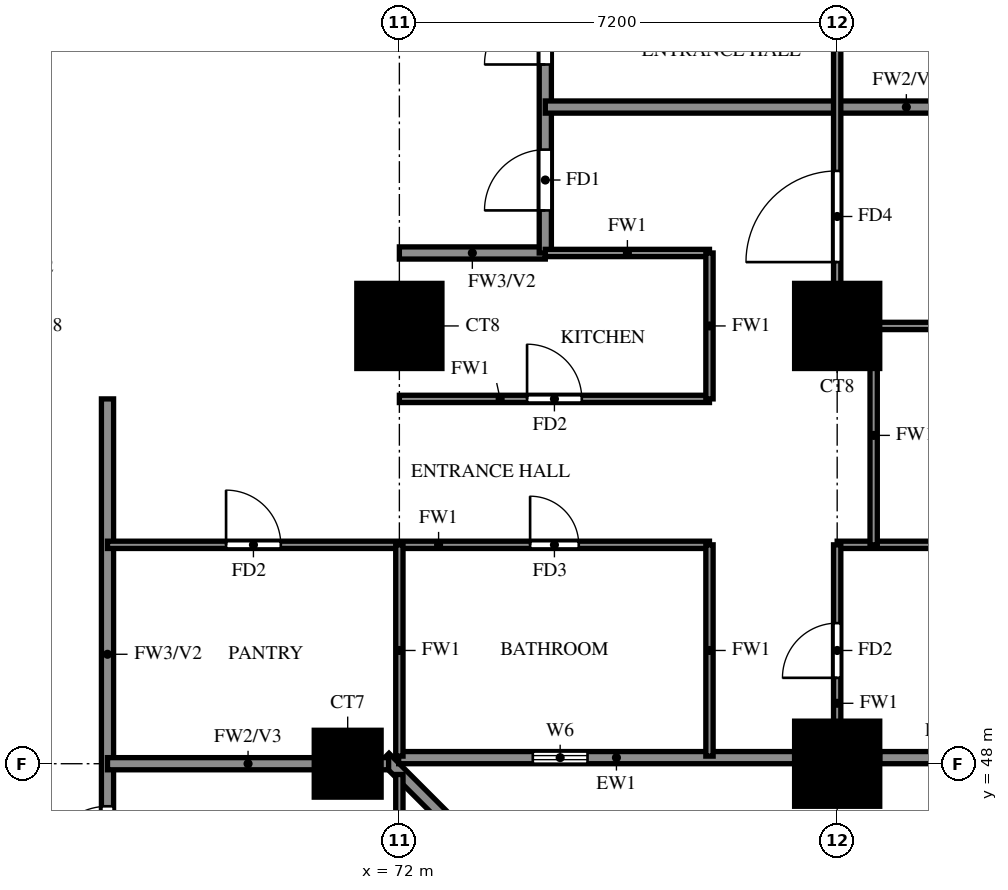
"""IFC4 building model, lengths in metres.
Left out: names, types, materials, properties, quantities, classifications, styles, units other than length and angle.
Written with IfcOpenShell. Run it as: python <this file> out.ifc"""

import sys

from ifc_helpers import new_model, si_unit, direction, frame, frame_2d, origin, origin_2d, place, context, subcontext, project, spatial, rectangle, extrude, source, transform, mapped, element, fill, save


model = new_model("IFC4")
c1 = context("Model", 3, precision=1e-05, world=origin(), true_north=direction((0.0, 1.0)))
c2 = subcontext(c1, "Body", "Model", "MODEL_VIEW")
j1 = project(units=[si_unit("LENGTHUNIT", "METRE"), si_unit("PLANEANGLEUNIT", "RADIAN")], contexts=[c1])
p1 = place(None, origin())
s1 = spatial("IfcSite", under=j1, at=p1, CompositionType="ELEMENT")
p2 = place(p1, origin())
s2 = spatial("IfcBuilding", under=s1, at=p2, CompositionType="ELEMENT")
p3 = place(p2, frame((0.0, 0.0, 58.5)))
s3 = spatial("IfcBuildingStorey", under=s2, at=p3, CompositionType="ELEMENT", Elevation=58.5)
m1 = source(origin(), c2, "Body", "SweptSolid", [
    extrude(rectangle(XDim=1.1, YDim=1.1, at=origin_2d()), origin(), (0.0, 0.0, 1.0), 3.18),
])
p4 = place(p3, frame((71.15, 48.0, 0.0), z_axis=(0.0, 0.0, 1.0), x_axis=(1.0, 0.0, 0.0)))
e1 = element("IfcColumn", 1, at=p4, inside=s3, PredefinedType="COLUMN", context=c2, shape_type="MappedRepresentation", body=[
    mapped(m1, transform((0.0, 0.0, 0.0))),
])
m2 = source(origin(), c2, "Body", "SweptSolid", [
    extrude(rectangle(XDim=1.4, YDim=1.4, at=origin_2d()), origin(), (0.0, 0.0, 1.0), 3.18),
])
for number, where, z_axis, x_axis in (
    (2, (79.2, 48.0, 0.0), (0.0, 0.0, 1.0), (1.0, 0.0, 0.0)),
    (3, (72.0, 55.2, 0.0), (0.0, 0.0, 1.0), (1.0, 0.0, 0.0)),
    (4, (79.2, 55.2, 0.0), (0.0, 0.0, 1.0), (1.0, 0.0, 0.0)),
):
    element("IfcColumn", number, at=place(p3, frame(where, z_axis=z_axis, x_axis=x_axis)), inside=s3, PredefinedType="COLUMN", context=c2, shape_type="MappedRepresentation", body=[
        mapped(m2, transform((0.0, 0.0, 0.0))),
    ])
p5 = place(p3, frame((78.74, 41.118, 0.0), z_axis=(0.0, 0.0, 1.0), x_axis=(-0.707106781187, 0.707106781187, 0.0)))
e5 = element("IfcWall", 5, at=p5, inside=s3, PredefinedType="SOLIDWALL", context=c2, shape_type="SweptSolid", body=[
    extrude(rectangle(XDim=9.874, YDim=0.2, at=frame_2d((4.937, 0.0))), origin(), (0.0, 0.0, 1.0), 3.18),
])
p6 = place(p5, frame((2.264, 0.0, 0.6)))
e6 = element("IfcOpeningElement", 6, at=p6, cuts=e5, PredefinedType="OPENING", context=c2, shape_type="SweptSolid", body=[
    extrude(rectangle(XDim=2.4, YDim=2.4, at=frame_2d((1.2, 1.2))), frame((0.0, 0.11, 0.0), z_axis=(0.0, -1.0, 0.0), x_axis=(1.0, 0.0, 0.0)), (0.0, 0.0, 1.0), 0.22),
])
p7 = place(p5, frame((5.836, 0.0, 0.6)))
e7 = element("IfcOpeningElement", 7, at=p7, cuts=e5, PredefinedType="OPENING", context=c2, shape_type="SweptSolid", body=[
    extrude(rectangle(XDim=2.4, YDim=2.4, at=frame_2d((1.2, 1.2))), frame((0.0, 0.11, 0.0), z_axis=(0.0, -1.0, 0.0), x_axis=(1.0, 0.0, 0.0)), (0.0, 0.0, 1.0), 0.22),
])
p8 = place(p3, frame((71.989, 48.1, 0.0), z_axis=(0.0, 0.0, 1.0), x_axis=(1.0, 0.0, 0.0)))
e8 = element("IfcWall", 8, at=p8, inside=s3, PredefinedType="SOLIDWALL", context=c2, shape_type="SweptSolid", body=[
    extrude(rectangle(XDim=6.511, YDim=0.2, at=frame_2d((3.256, 0.0))), origin(), (0.0, 0.0, 1.0), 3.18),
])
p9 = place(p8, frame((2.206, 0.0, 1.5)))
e9 = element("IfcOpeningElement", 9, at=p9, cuts=e8, PredefinedType="OPENING", context=c2, shape_type="SweptSolid", body=[
    extrude(rectangle(XDim=0.9, YDim=0.9, at=frame_2d((0.45, 0.45))), frame((0.0, 0.11, 0.0), z_axis=(0.0, -1.0, 0.0), x_axis=(1.0, 0.0, 0.0)), (0.0, 0.0, 1.0), 0.22),
])
p10 = place(p3, frame((79.9, 48.1, 0.0), z_axis=(0.0, 0.0, 1.0), x_axis=(1.0, 0.0, 0.0)))
e10 = element("IfcWall", 10, at=p10, inside=s3, PredefinedType="SOLIDWALL", context=c2, shape_type="SweptSolid", body=[
    extrude(rectangle(XDim=5.35, YDim=0.2, at=frame_2d((2.675, 0.0))), origin(), (0.0, 0.0, 1.0), 3.18),
])
p11 = place(p10, frame((1.475, 0.0, 0.6)))
e11 = element("IfcOpeningElement", 11, at=p11, cuts=e10, PredefinedType="OPENING", context=c2, shape_type="SweptSolid", body=[
    extrude(rectangle(XDim=2.4, YDim=2.4, at=frame_2d((1.2, 1.2))), frame((0.0, 0.11, 0.0), z_axis=(0.0, -1.0, 0.0), x_axis=(1.0, 0.0, 0.0)), (0.0, 0.0, 1.0), 0.22),
])
p12 = place(p3, frame((72.0, 56.4, 0.0), z_axis=(0.0, 0.0, 1.0), x_axis=(1.0, 0.0, 0.0)))
e12 = element("IfcWall", 12, at=p12, inside=s3, PredefinedType="SOLIDWALL", context=c2, shape_type="SweptSolid", body=[
    extrude(rectangle(XDim=2.4, YDim=0.2, at=frame_2d((1.2, 0.0))), origin(), (0.0, 0.0, 1.0), 3.18),
])
p13 = place(p3, frame((67.2, 45.6, 0.0), z_axis=(0.0, 0.0, 1.0), x_axis=(0.0, 1.0, 0.0)))
e13 = element("IfcWall", 13, at=p13, inside=s3, PredefinedType="SOLIDWALL", context=c2, shape_type="SweptSolid", body=[
    extrude(rectangle(XDim=8.4, YDim=0.2, at=frame_2d((4.2, 0.0))), origin(), (0.0, 0.0, 1.0), 3.18),
])
p14 = place(p13, frame((0.7, 0.0, 0.0)))
e14 = element("IfcOpeningElement", 14, at=p14, cuts=e13, PredefinedType="OPENING", context=c2, shape_type="SweptSolid", body=[
    extrude(rectangle(XDim=1.0, YDim=2.1, at=frame_2d((0.5, 1.05))), frame((0.0, 0.11, 0.0), z_axis=(0.0, -1.0, 0.0), x_axis=(1.0, 0.0, 0.0)), (0.0, 0.0, 1.0), 0.22),
])
p15 = place(p3, frame((74.4, 56.4, 0.0), z_axis=(0.0, 0.0, 1.0), x_axis=(0.0, 1.0, 0.0)))
e15 = element("IfcWall", 15, at=p15, inside=s3, PredefinedType="SOLIDWALL", context=c2, shape_type="SweptSolid", body=[
    extrude(rectangle(XDim=9.6, YDim=0.2, at=frame_2d((4.8, 0.0))), origin(), (0.0, 0.0, 1.0), 3.18),
])
p16 = place(p15, frame((0.7, 0.0, 0.0)))
e16 = element("IfcOpeningElement", 16, at=p16, cuts=e15, PredefinedType="OPENING", context=c2, shape_type="SweptSolid", body=[
    extrude(rectangle(XDim=1.0, YDim=2.1, at=frame_2d((0.5, 1.05))), frame((0.0, 0.11, 0.0), z_axis=(0.0, -1.0, 0.0), x_axis=(1.0, 0.0, 0.0)), (0.0, 0.0, 1.0), 0.22),
])
p17 = place(p15, frame((3.1, 0.0, 0.0)))
e17 = element("IfcOpeningElement", 17, at=p17, cuts=e15, PredefinedType="OPENING", context=c2, shape_type="SweptSolid", body=[
    extrude(rectangle(XDim=1.0, YDim=2.1, at=frame_2d((0.5, 1.05))), frame((0.0, 0.11, 0.0), z_axis=(0.0, -1.0, 0.0), x_axis=(1.0, 0.0, 0.0)), (0.0, 0.0, 1.0), 0.22),
])
p18 = place(p3, frame((67.2, 48.0, 0.0), z_axis=(0.0, 0.0, 1.0), x_axis=(1.0, 0.0, 0.0)))
e18 = element("IfcWall", 18, at=p18, inside=s3, PredefinedType="SOLIDWALL", context=c2, shape_type="SweptSolid", body=[
    extrude(rectangle(XDim=4.623, YDim=0.2, at=frame_2d((2.312, 0.0))), origin(), (0.0, 0.0, 1.0), 3.18),
])
p19 = place(p3, frame((74.4, 58.8, 0.0), z_axis=(0.0, 0.0, 1.0), x_axis=(1.0, 0.0, 0.0)))
e19 = element("IfcWall", 19, at=p19, inside=s3, PredefinedType="SOLIDWALL", context=c2, shape_type="SweptSolid", body=[
    extrude(rectangle(XDim=11.875, YDim=0.2, at=frame_2d((5.938, 0.0))), origin(), (0.0, 0.0, 1.0), 2.28),
])
p20 = place(p3, frame((67.2, 51.6, 0.0), z_axis=(0.0, 0.0, 1.0), x_axis=(1.0, 0.0, 0.0)))
e20 = element("IfcWall", 20, at=p20, inside=s3, PredefinedType="PARTITIONING", context=c2, shape_type="SweptSolid", body=[
    extrude(rectangle(XDim=9.9, YDim=0.12, at=frame_2d((4.95, 0.0))), origin(), (0.0, 0.0, 1.0), 3.18),
])
p21 = place(p20, frame((6.95, 0.0, 0.0)))
e21 = element("IfcOpeningElement", 21, at=p21, cuts=e20, PredefinedType="OPENING", context=c2, shape_type="SweptSolid", body=[
    extrude(rectangle(XDim=0.8, YDim=2.1, at=frame_2d((0.4, 1.05))), frame((0.0, 0.07, 0.0), z_axis=(0.0, -1.0, 0.0), x_axis=(1.0, 0.0, 0.0)), (0.0, 0.0, 1.0), 0.14),
])
p22 = place(p20, frame((1.95, 0.0, 0.0)))
e22 = element("IfcOpeningElement", 22, at=p22, cuts=e20, PredefinedType="OPENING", context=c2, shape_type="SweptSolid", body=[
    extrude(rectangle(XDim=0.9, YDim=2.1, at=frame_2d((0.45, 1.05))), frame((0.0, 0.07, 0.0), z_axis=(0.0, -1.0, 0.0), x_axis=(1.0, 0.0, 0.0)), (0.0, 0.0, 1.0), 0.14),
])
p23 = place(p3, frame((79.2, 51.6, 0.0), z_axis=(0.0, 0.0, 1.0), x_axis=(1.0, 0.0, 0.0)))
e23 = element("IfcWall", 23, at=p23, inside=s3, PredefinedType="PARTITIONING", context=c2, shape_type="SweptSolid", body=[
    extrude(rectangle(XDim=7.075, YDim=0.12, at=frame_2d((3.538, 0.0))), origin(), (0.0, 0.0, 1.0), 2.28),
])
p24 = place(p23, frame((3.438, 0.0, 0.0)))
e24 = element("IfcOpeningElement", 24, at=p24, cuts=e23, PredefinedType="OPENING", context=c2, shape_type="SweptSolid", body=[
    extrude(rectangle(XDim=0.8, YDim=2.1, at=frame_2d((0.4, 1.05))), frame((0.0, 0.07, 0.0), z_axis=(0.0, -1.0, 0.0), x_axis=(1.0, 0.0, 0.0)), (0.0, 0.0, 1.0), 0.14),
])
p25 = place(p3, frame((72.0, 54.0, 0.0), z_axis=(0.0, 0.0, 1.0), x_axis=(1.0, 0.0, 0.0)))
e25 = element("IfcWall", 25, at=p25, inside=s3, PredefinedType="PARTITIONING", context=c2, shape_type="SweptSolid", body=[
    extrude(rectangle(XDim=5.1, YDim=0.12, at=frame_2d((2.55, 0.0))), origin(), (0.0, 0.0, 1.0), 3.18),
])
p26 = place(p25, frame((2.1, 0.0, 0.0)))
e26 = element("IfcOpeningElement", 26, at=p26, cuts=e25, PredefinedType="OPENING", context=c2, shape_type="SweptSolid", body=[
    extrude(rectangle(XDim=0.9, YDim=2.1, at=frame_2d((0.45, 1.05))), frame((0.0, 0.07, 0.0), z_axis=(0.0, -1.0, 0.0), x_axis=(1.0, 0.0, 0.0)), (0.0, 0.0, 1.0), 0.14),
])
p27 = place(p3, frame((79.2, 55.2, 0.0), z_axis=(0.0, 0.0, 1.0), x_axis=(1.0, 0.0, 0.0)))
e27 = element("IfcWall", 27, at=p27, inside=s3, PredefinedType="PARTITIONING", context=c2, shape_type="SweptSolid", body=[
    extrude(rectangle(XDim=7.075, YDim=0.12, at=frame_2d((3.538, 0.0))), origin(), (0.0, 0.0, 1.0), 3.18),
])
p28 = place(p3, frame((74.4, 56.4, 0.0), z_axis=(0.0, 0.0, 1.0), x_axis=(1.0, 0.0, 0.0)))
e28 = element("IfcWall", 28, at=p28, inside=s3, PredefinedType="PARTITIONING", context=c2, shape_type="SweptSolid", body=[
    extrude(rectangle(XDim=2.7, YDim=0.12, at=frame_2d((1.35, 0.0))), origin(), (0.0, 0.0, 1.0), 3.18),
])
p29 = place(p3, frame((72.0, 33.725, 0.0), z_axis=(0.0, 0.0, 1.0), x_axis=(0.0, 1.0, 0.0)))
e29 = element("IfcWall", 29, at=p29, inside=s3, PredefinedType="PARTITIONING", context=c2, shape_type="SweptSolid", body=[
    extrude(rectangle(XDim=14.098, YDim=0.12, at=frame_2d((7.049, 0.0))), origin(), (0.0, 0.0, 1.0), 2.28),
])
p30 = place(p29, frame((10.075, 0.0, 0.0)))
e30 = element("IfcOpeningElement", 30, at=p30, cuts=e29, PredefinedType="OPENING", context=c2, shape_type="SweptSolid", body=[
    extrude(rectangle(XDim=0.9, YDim=2.1, at=frame_2d((0.45, 1.05))), frame((0.0, 0.07, 0.0), z_axis=(0.0, -1.0, 0.0), x_axis=(1.0, 0.0, 0.0)), (0.0, 0.0, 1.0), 0.14),
])
for number, where, z_axis, x_axis in (
    (31, (72.0, 48.125, 0.0), (0.0, 0.0, 1.0), (0.0, 1.0, 0.0)),
    (32, (77.1, 48.125, 0.0), (0.0, 0.0, 1.0), (0.0, 1.0, 0.0)),
):
    element("IfcWall", number, at=place(p3, frame(where, z_axis=z_axis, x_axis=x_axis)), inside=s3, PredefinedType="PARTITIONING", context=c2, shape_type="SweptSolid", body=[
        extrude(rectangle(XDim=3.475, YDim=0.12, at=frame_2d((1.738, 0.0))), origin(), (0.0, 0.0, 1.0), 3.18),
    ])
p31 = place(p3, frame((77.1, 54.0, 0.0), z_axis=(0.0, 0.0, 1.0), x_axis=(0.0, 1.0, 0.0)))
e33 = element("IfcWall", 33, at=p31, inside=s3, PredefinedType="PARTITIONING", context=c2, shape_type="SweptSolid", body=[
    extrude(rectangle(XDim=2.4, YDim=0.12, at=frame_2d((1.2, 0.0))), origin(), (0.0, 0.0, 1.0), 3.18),
])
p32 = place(p3, frame((79.2, 48.125, 0.0), z_axis=(0.0, 0.0, 1.0), x_axis=(0.0, 1.0, 0.0)))
e34 = element("IfcWall", 34, at=p32, inside=s3, PredefinedType="PARTITIONING", context=c2, shape_type="SweptSolid", body=[
    extrude(rectangle(XDim=3.475, YDim=0.12, at=frame_2d((1.738, 0.0))), origin(), (0.0, 0.0, 1.0), 3.18),
])
p33 = place(p32, frame((1.288, 0.0, 0.0)))
e35 = element("IfcOpeningElement", 35, at=p33, cuts=e34, PredefinedType="OPENING", context=c2, shape_type="SweptSolid", body=[
    extrude(rectangle(XDim=0.9, YDim=2.1, at=frame_2d((0.45, 1.05))), frame((0.0, 0.07, 0.0), z_axis=(0.0, -1.0, 0.0), x_axis=(1.0, 0.0, 0.0)), (0.0, 0.0, 1.0), 0.14),
])
p34 = place(p3, frame((79.2, 55.2, 0.0), z_axis=(0.0, 0.0, 1.0), x_axis=(0.0, 1.0, 0.0)))
e36 = element("IfcWall", 36, at=p34, inside=s3, PredefinedType="PARTITIONING", context=c2, shape_type="SweptSolid", body=[
    extrude(rectangle(XDim=14.4, YDim=0.12, at=frame_2d((7.2, 0.0))), origin(), (0.0, 0.0, 1.0), 3.18),
])
p35 = place(p34, frame((1.05, 0.0, 0.0)))
e37 = element("IfcOpeningElement", 37, at=p35, cuts=e36, PredefinedType="OPENING", context=c2, shape_type="SweptSolid", body=[
    extrude(rectangle(XDim=1.5, YDim=2.1, at=frame_2d((0.75, 1.05))), frame((0.0, 0.07, 0.0), z_axis=(0.0, -1.0, 0.0), x_axis=(1.0, 0.0, 0.0)), (0.0, 0.0, 1.0), 0.14),
])
p36 = place(p34, frame((4.95, 0.0, 0.0)))
e38 = element("IfcOpeningElement", 38, at=p36, cuts=e36, PredefinedType="OPENING", context=c2, shape_type="SweptSolid", body=[
    extrude(rectangle(XDim=0.9, YDim=2.1, at=frame_2d((0.45, 1.05))), frame((0.0, 0.07, 0.0), z_axis=(0.0, -1.0, 0.0), x_axis=(1.0, 0.0, 0.0)), (0.0, 0.0, 1.0), 0.14),
])
p37 = place(p34, frame((10.35, 0.0, 0.0)))
e39 = element("IfcOpeningElement", 39, at=p37, cuts=e36, PredefinedType="OPENING", context=c2, shape_type="SweptSolid", body=[
    extrude(rectangle(XDim=0.9, YDim=2.1, at=frame_2d((0.45, 1.05))), frame((0.0, 0.07, 0.0), z_axis=(0.0, -1.0, 0.0), x_axis=(1.0, 0.0, 0.0)), (0.0, 0.0, 1.0), 0.14),
])
p38 = place(p3, frame((79.8, 51.6, 0.0), z_axis=(0.0, 0.0, 1.0), x_axis=(0.0, 1.0, 0.0)))
e40 = element("IfcWall", 40, at=p38, inside=s3, PredefinedType="PARTITIONING", context=c2, shape_type="SweptSolid", body=[
    extrude(rectangle(XDim=3.6, YDim=0.12, at=frame_2d((1.8, 0.0))), origin(), (0.0, 0.0, 1.0), 3.18),
])
p39 = place(p9, origin())
e41 = element("IfcWindow", 41, at=p39, inside=s3, PartitioningType="SINGLE_PANEL", PredefinedType="WINDOW", context=c2, shape_type="SweptSolid", body=[
    extrude(rectangle(XDim=0.9, YDim=0.9, at=frame_2d((0.45, 0.45))), frame((0.0, 0.03, 0.0), z_axis=(0.0, -1.0, 0.0), x_axis=(1.0, 0.0, 0.0)), (0.0, 0.0, 1.0), 0.06),
])
fill(e9, e41)
p40 = place(p16, origin())
e42 = element("IfcDoor", 42, at=p40, inside=s3, OperationType="SINGLE_SWING_LEFT", PredefinedType="DOOR", context=c2, shape_type="SweptSolid", body=[
    extrude(rectangle(XDim=1.0, YDim=2.1, at=frame_2d((0.5, 1.05))), frame((0.0, 0.025, 0.0), z_axis=(0.0, -1.0, 0.0), x_axis=(1.0, 0.0, 0.0)), (0.0, 0.0, 1.0), 0.05),
])
fill(e16, e42)
p41 = place(p33, origin())
e43 = element("IfcDoor", 43, at=p41, inside=s3, OperationType="SINGLE_SWING_LEFT", PredefinedType="DOOR", context=c2, shape_type="SweptSolid", body=[
    extrude(rectangle(XDim=0.9, YDim=2.1, at=frame_2d((0.45, 1.05))), frame((0.0, 0.025, 0.0), z_axis=(0.0, -1.0, 0.0), x_axis=(1.0, 0.0, 0.0)), (0.0, 0.0, 1.0), 0.05),
])
fill(e35, e43)
p42 = place(p35, origin())
e44 = element("IfcDoor", 44, at=p42, inside=s3, OperationType="SINGLE_SWING_LEFT", PredefinedType="DOOR", context=c2, shape_type="SweptSolid", body=[
    extrude(rectangle(XDim=1.5, YDim=2.1, at=frame_2d((0.75, 1.05))), frame((0.0, 0.025, 0.0), z_axis=(0.0, -1.0, 0.0), x_axis=(1.0, 0.0, 0.0)), (0.0, 0.0, 1.0), 0.05),
])
fill(e37, e44)
p43 = place(p21, origin())
e45 = element("IfcDoor", 45, at=p43, inside=s3, OperationType="SINGLE_SWING_LEFT", PredefinedType="DOOR", context=c2, shape_type="SweptSolid", body=[
    extrude(rectangle(XDim=0.8, YDim=2.1, at=frame_2d((0.4, 1.05))), frame((0.0, 0.025, 0.0), z_axis=(0.0, -1.0, 0.0), x_axis=(1.0, 0.0, 0.0)), (0.0, 0.0, 1.0), 0.05),
])
fill(e21, e45)
p44 = place(p26, origin())
e46 = element("IfcDoor", 46, at=p44, inside=s3, OperationType="SINGLE_SWING_RIGHT", PredefinedType="DOOR", context=c2, shape_type="SweptSolid", body=[
    extrude(rectangle(XDim=0.9, YDim=2.1, at=frame_2d((0.45, 1.05))), frame((0.0, 0.025, 0.0), z_axis=(0.0, -1.0, 0.0), x_axis=(1.0, 0.0, 0.0)), (0.0, 0.0, 1.0), 0.05),
])
fill(e26, e46)
p45 = place(p22, origin())
e47 = element("IfcDoor", 47, at=p45, inside=s3, OperationType="SINGLE_SWING_LEFT", PredefinedType="DOOR", context=c2, shape_type="SweptSolid", body=[
    extrude(rectangle(XDim=0.9, YDim=2.1, at=frame_2d((0.45, 1.05))), frame((0.0, 0.025, 0.0), z_axis=(0.0, -1.0, 0.0), x_axis=(1.0, 0.0, 0.0)), (0.0, 0.0, 1.0), 0.05),
])
fill(e22, e47)
p46 = place(p17, origin())
e48 = element("IfcDoor", 48, at=p46, inside=s3, OperationType="SINGLE_SWING_LEFT", PredefinedType="DOOR", context=c2, shape_type="SweptSolid", body=[
    extrude(rectangle(XDim=1.0, YDim=2.1, at=frame_2d((0.5, 1.05))), frame((0.0, 0.025, 0.0), z_axis=(0.0, -1.0, 0.0), x_axis=(1.0, 0.0, 0.0)), (0.0, 0.0, 1.0), 0.05),
])
fill(e17, e48)
p47 = place(p14, origin())
e49 = element("IfcDoor", 49, at=p47, inside=s3, OperationType="SINGLE_SWING_LEFT", PredefinedType="DOOR", context=c2, shape_type="SweptSolid", body=[
    extrude(rectangle(XDim=1.0, YDim=2.1, at=frame_2d((0.5, 1.05))), frame((0.0, 0.025, 0.0), z_axis=(0.0, -1.0, 0.0), x_axis=(1.0, 0.0, 0.0)), (0.0, 0.0, 1.0), 0.05),
])
fill(e14, e49)
save(model, sys.argv[1])
